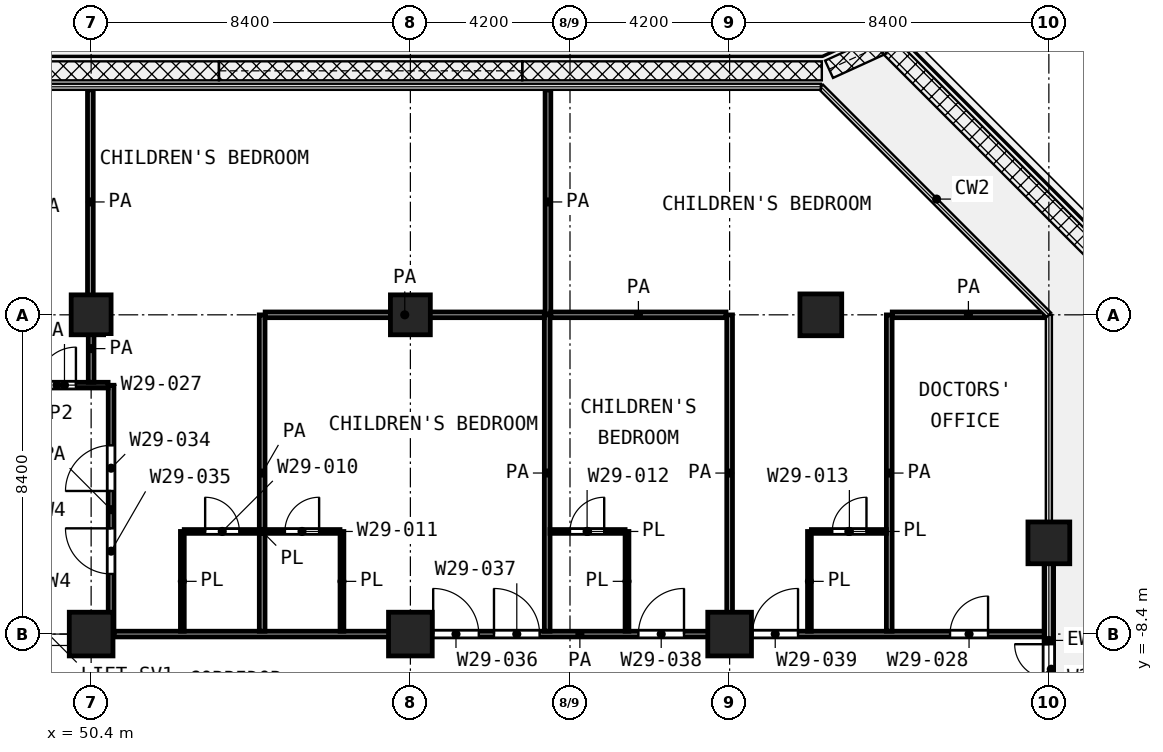
"""IFC4 building model, lengths in metres.
Left out: names, types, materials, properties, quantities, classifications, styles, units other than length and angle.
Written with IfcOpenShell. Run it as: python <this file> out.ifc"""

import sys

from ifc_helpers import new_model, si_unit, direction, frame, frame_2d, origin, origin_2d, place, context, subcontext, project, spatial, rectangle, extrude, element, fill, save


model = new_model("IFC4")
c1 = context("Model", 3, precision=1e-05, world=origin(), true_north=direction((0.0, 1.0)))
c2 = subcontext(c1, "Body", "Model", "MODEL_VIEW")
j1 = project(units=[si_unit("LENGTHUNIT", "METRE"), si_unit("PLANEANGLEUNIT", "RADIAN")], contexts=[c1])
p1 = place(None, origin())
s1 = spatial("IfcSite", under=j1, at=p1, CompositionType="ELEMENT")
p2 = place(p1, origin())
s2 = spatial("IfcBuilding", under=s1, at=p2, CompositionType="ELEMENT")
p3 = place(p2, frame((0.0, 0.0, 149.2)))
s3 = spatial("IfcBuildingStorey", under=s2, at=p3, CompositionType="ELEMENT", Elevation=149.2)
for number, where, z_axis, x_axis in (
    (1, (50.4, 0.0, 0.0), (0.0, 0.0, 1.0), (1.0, 0.0, 0.0)),
    (2, (58.8, 0.0, 0.0), (0.0, 0.0, 1.0), (1.0, 0.0, 0.0)),
):
    element("IfcColumn", number, at=place(p3, frame(where, z_axis=z_axis, x_axis=x_axis)), inside=s3, PredefinedType="COLUMN", context=c2, shape_type="SweptSolid", body=[
        extrude(rectangle(XDim=1.05, YDim=1.05, at=origin_2d()), origin(), (0.0, 0.0, 1.0), 4.2),
    ])
for number, where, z_axis, x_axis in (
    (3, (69.6, 0.0, 0.0), (0.0, 0.0, 1.0), (1.0, 0.0, 0.0)),
    (4, (75.6, -6.0, 0.0), (0.0, 0.0, 1.0), (1.0, 0.0, 0.0)),
):
    element("IfcColumn", number, at=place(p3, frame(where, z_axis=z_axis, x_axis=x_axis)), inside=s3, PredefinedType="COLUMN", context=c2, shape_type="SweptSolid", body=[
        extrude(rectangle(XDim=1.1, YDim=1.1, at=origin_2d()), origin(), (0.0, 0.0, 1.0), 4.2),
    ])
for number, where, z_axis, x_axis in (
    (5, (50.4, -8.4, 0.0), (0.0, 0.0, 1.0), (1.0, 0.0, 0.0)),
    (6, (58.8, -8.4, 0.0), (0.0, 0.0, 1.0), (1.0, 0.0, 0.0)),
    (7, (67.2, -8.4, 0.0), (0.0, 0.0, 1.0), (1.0, 0.0, 0.0)),
):
    element("IfcColumn", number, at=place(p3, frame(where, z_axis=z_axis, x_axis=x_axis)), inside=s3, PredefinedType="COLUMN", context=c2, shape_type="SweptSolid", body=[
        extrude(rectangle(XDim=1.15, YDim=1.15, at=origin_2d()), origin(), (0.0, 0.0, 1.0), 4.2),
    ])
p4 = place(p3, frame((75.6, -10.583, 0.0), z_axis=(0.0, 0.0, 1.0), x_axis=(0.0, 1.0, 0.0)))
e8 = element("IfcWall", 8, at=p4, inside=s3, PredefinedType="SOLIDWALL", context=c2, shape_type="SweptSolid", body=[
    extrude(rectangle(XDim=4.033, YDim=0.25, at=frame_2d((2.017, 0.0))), origin(), (0.0, 0.0, 1.0), 3.58),
])
p5 = place(p4, frame((0.117, 0.0, 0.0)))
e9 = element("IfcOpeningElement", 9, at=p5, cuts=e8, PredefinedType="OPENING", context=c2, shape_type="SweptSolid", body=[
    extrude(rectangle(XDim=1.8, YDim=2.1, at=frame_2d((0.9, 1.05))), frame((0.0, 0.135, 0.0), z_axis=(0.0, -1.0, 0.0), x_axis=(1.0, 0.0, 0.0)), (0.0, 0.0, 1.0), 0.27),
])
p6 = place(p3, frame((52.85, -5.7, 0.0), z_axis=(0.0, 0.0, 1.0), x_axis=(1.0, 0.0, 0.0)))
e10 = element("IfcWall", 10, at=p6, inside=s3, PredefinedType="PARTITIONING", context=c2, shape_type="SweptSolid", body=[
    extrude(rectangle(XDim=4.098, YDim=0.1, at=frame_2d((2.049, 0.0))), origin(), (0.0, 0.0, 1.0), 3.7),
])
p7 = place(p6, frame((0.55, 0.0, 0.0)))
e11 = element("IfcOpeningElement", 11, at=p7, cuts=e10, PredefinedType="OPENING", context=c2, shape_type="SweptSolid", body=[
    extrude(rectangle(XDim=0.9, YDim=2.1, at=frame_2d((0.45, 1.05))), frame((0.0, 0.06, 0.0), z_axis=(0.0, -1.0, 0.0), x_axis=(1.0, 0.0, 0.0)), (0.0, 0.0, 1.0), 0.12),
])
p8 = place(p6, frame((2.649, 0.0, 0.0)))
e12 = element("IfcOpeningElement", 12, at=p8, cuts=e10, PredefinedType="OPENING", context=c2, shape_type="SweptSolid", body=[
    extrude(rectangle(XDim=0.9, YDim=2.1, at=frame_2d((0.45, 1.05))), frame((0.0, 0.06, 0.0), z_axis=(0.0, -1.0, 0.0), x_axis=(1.0, 0.0, 0.0)), (0.0, 0.0, 1.0), 0.12),
])
p9 = place(p3, frame((62.475, -5.7, 0.0), z_axis=(0.0, 0.0, 1.0), x_axis=(1.0, 0.0, 0.0)))
e13 = element("IfcWall", 13, at=p9, inside=s3, PredefinedType="PARTITIONING", context=c2, shape_type="SweptSolid", body=[
    extrude(rectangle(XDim=1.975, YDim=0.1, at=frame_2d((0.987, 0.0))), origin(), (0.0, 0.0, 1.0), 3.7),
])
p10 = place(p9, frame((0.525, 0.0, 0.0)))
e14 = element("IfcOpeningElement", 14, at=p10, cuts=e13, PredefinedType="OPENING", context=c2, shape_type="SweptSolid", body=[
    extrude(rectangle(XDim=0.9, YDim=2.1, at=frame_2d((0.45, 1.05))), frame((0.0, 0.06, 0.0), z_axis=(0.0, -1.0, 0.0), x_axis=(1.0, 0.0, 0.0)), (0.0, 0.0, 1.0), 0.12),
])
p11 = place(p3, frame((69.352, -5.7, 0.0), z_axis=(0.0, 0.0, 1.0), x_axis=(1.0, 0.0, 0.0)))
e15 = element("IfcWall", 15, at=p11, inside=s3, PredefinedType="PARTITIONING", context=c2, shape_type="SweptSolid", body=[
    extrude(rectangle(XDim=1.973, YDim=0.1, at=frame_2d((0.986, 0.0))), origin(), (0.0, 0.0, 1.0), 3.7),
])
p12 = place(p11, frame((0.549, 0.0, 0.0)))
e16 = element("IfcOpeningElement", 16, at=p12, cuts=e15, PredefinedType="OPENING", context=c2, shape_type="SweptSolid", body=[
    extrude(rectangle(XDim=0.9, YDim=2.1, at=frame_2d((0.45, 1.05))), frame((0.0, 0.06, 0.0), z_axis=(0.0, -1.0, 0.0), x_axis=(1.0, 0.0, 0.0)), (0.0, 0.0, 1.0), 0.12),
])
p13 = place(p3, frame((52.8, -8.325, 0.0), z_axis=(0.0, 0.0, 1.0), x_axis=(0.0, 1.0, 0.0)))
e17 = element("IfcWall", 17, at=p13, inside=s3, PredefinedType="PARTITIONING", context=c2, shape_type="SweptSolid", body=[
    extrude(rectangle(XDim=2.625, YDim=0.1, at=frame_2d((1.312, 0.0))), origin(), (0.0, 0.0, 1.0), 3.7),
])
p14 = place(p3, frame((57.0, -8.325, 0.0), z_axis=(0.0, 0.0, 1.0), x_axis=(0.0, 1.0, 0.0)))
e18 = element("IfcWall", 18, at=p14, inside=s3, PredefinedType="PARTITIONING", context=c2, shape_type="SweptSolid", body=[
    extrude(rectangle(XDim=2.624, YDim=0.1, at=frame_2d((1.312, 0.0))), origin(), (0.0, 0.0, 1.0), 3.7),
])
p15 = place(p3, frame((64.5, -8.325, 0.0), z_axis=(0.0, 0.0, 1.0), x_axis=(0.0, 1.0, 0.0)))
e19 = element("IfcWall", 19, at=p15, inside=s3, PredefinedType="PARTITIONING", context=c2, shape_type="SweptSolid", body=[
    extrude(rectangle(XDim=2.625, YDim=0.1, at=frame_2d((1.312, 0.0))), origin(), (0.0, 0.0, 1.0), 3.7),
])
p16 = place(p3, frame((69.3, -8.325, 0.0), z_axis=(0.0, 0.0, 1.0), x_axis=(0.0, 1.0, 0.0)))
e20 = element("IfcWall", 20, at=p16, inside=s3, PredefinedType="PARTITIONING", context=c2, shape_type="SweptSolid", body=[
    extrude(rectangle(XDim=2.624, YDim=0.1, at=frame_2d((1.312, 0.0))), origin(), (0.0, 0.0, 1.0), 3.7),
])
p17 = place(p3, frame((51.0, -8.4, 0.0), z_axis=(0.0, 0.0, 1.0), x_axis=(1.0, 0.0, 0.0)))
e21 = element("IfcWall", 21, at=p17, inside=s3, PredefinedType="PARTITIONING", context=c2, shape_type="SweptSolid", body=[
    extrude(rectangle(XDim=24.52, YDim=0.15, at=frame_2d((12.26, 0.0))), origin(), (0.0, 0.0, 1.0), 3.7),
])
p18 = place(p17, frame((8.4, 0.0, 0.0)))
e22 = element("IfcOpeningElement", 22, at=p18, cuts=e21, PredefinedType="OPENING", context=c2, shape_type="SweptSolid", body=[
    extrude(rectangle(XDim=1.2, YDim=2.1, at=frame_2d((0.6, 1.05))), frame((0.0, 0.085, 0.0), z_axis=(0.0, -1.0, 0.0), x_axis=(1.0, 0.0, 0.0)), (0.0, 0.0, 1.0), 0.17),
])
p19 = place(p17, frame((10.0, 0.0, 0.0)))
e23 = element("IfcOpeningElement", 23, at=p19, cuts=e21, PredefinedType="OPENING", context=c2, shape_type="SweptSolid", body=[
    extrude(rectangle(XDim=1.2, YDim=2.1, at=frame_2d((0.6, 1.05))), frame((0.0, 0.085, 0.0), z_axis=(0.0, -1.0, 0.0), x_axis=(1.0, 0.0, 0.0)), (0.0, 0.0, 1.0), 0.17),
])
p20 = place(p17, frame((13.8, 0.0, 0.0)))
e24 = element("IfcOpeningElement", 24, at=p20, cuts=e21, PredefinedType="OPENING", context=c2, shape_type="SweptSolid", body=[
    extrude(rectangle(XDim=1.2, YDim=2.1, at=frame_2d((0.6, 1.05))), frame((0.0, 0.085, 0.0), z_axis=(0.0, -1.0, 0.0), x_axis=(1.0, 0.0, 0.0)), (0.0, 0.0, 1.0), 0.17),
])
p21 = place(p17, frame((16.8, 0.0, 0.0)))
e25 = element("IfcOpeningElement", 25, at=p21, cuts=e21, PredefinedType="OPENING", context=c2, shape_type="SweptSolid", body=[
    extrude(rectangle(XDim=1.2, YDim=2.1, at=frame_2d((0.6, 1.05))), frame((0.0, 0.085, 0.0), z_axis=(0.0, -1.0, 0.0), x_axis=(1.0, 0.0, 0.0)), (0.0, 0.0, 1.0), 0.17),
])
p22 = place(p17, frame((22.0, 0.0, 0.0)))
e26 = element("IfcOpeningElement", 26, at=p22, cuts=e21, PredefinedType="OPENING", context=c2, shape_type="SweptSolid", body=[
    extrude(rectangle(XDim=1.0, YDim=2.1, at=frame_2d((0.5, 1.05))), frame((0.0, 0.085, 0.0), z_axis=(0.0, -1.0, 0.0), x_axis=(1.0, 0.0, 0.0)), (0.0, 0.0, 1.0), 0.17),
])
p23 = place(p3, frame((48.55, -1.85, 0.0), z_axis=(0.0, 0.0, 1.0), x_axis=(1.0, 0.0, 0.0)))
e27 = element("IfcWall", 27, at=p23, inside=s3, PredefinedType="PARTITIONING", context=c2, shape_type="SweptSolid", body=[
    extrude(rectangle(XDim=2.297, YDim=0.15, at=frame_2d((1.148, 0.0))), origin(), (0.0, 0.0, 1.0), 3.7),
])
p24 = place(p23, frame((0.45, 0.0, 0.0)))
e28 = element("IfcOpeningElement", 28, at=p24, cuts=e27, PredefinedType="OPENING", context=c2, shape_type="SweptSolid", body=[
    extrude(rectangle(XDim=1.0, YDim=2.1, at=frame_2d((0.5, 1.05))), frame((0.0, 0.085, 0.0), z_axis=(0.0, -1.0, 0.0), x_axis=(1.0, 0.0, 0.0)), (0.0, 0.0, 1.0), 0.17),
])
p25 = place(p3, frame((54.979, 0.0, 0.0), z_axis=(0.0, 0.0, 1.0), x_axis=(1.0, 0.0, 0.0)))
e29 = element("IfcWall", 29, at=p25, inside=s3, PredefinedType="PARTITIONING", context=c2, shape_type="SweptSolid", body=[
    extrude(rectangle(XDim=7.346, YDim=0.15, at=frame_2d((3.673, 0.0))), origin(), (0.0, 0.0, 1.0), 3.7),
])
p26 = place(p3, frame((62.495, 0.0, 0.0), z_axis=(0.0, 0.0, 1.0), x_axis=(1.0, 0.0, 0.0)))
e30 = element("IfcWall", 30, at=p26, inside=s3, PredefinedType="PARTITIONING", context=c2, shape_type="SweptSolid", body=[
    extrude(rectangle(XDim=4.61, YDim=0.15, at=frame_2d((2.305, 0.0))), origin(), (0.0, 0.0, 1.0), 3.7),
])
p27 = place(p3, frame((71.479, 0.0, 0.0), z_axis=(0.0, 0.0, 1.0), x_axis=(1.0, 0.0, 0.0)))
e31 = element("IfcWall", 31, at=p27, inside=s3, PredefinedType="PARTITIONING", context=c2, shape_type="SweptSolid", body=[
    extrude(rectangle(XDim=4.008, YDim=0.15, at=frame_2d((2.004, 0.0))), origin(), (0.0, 0.0, 1.0), 3.7),
])
p28 = place(p3, frame((50.38, 0.02, 0.0), z_axis=(0.0, 0.0, 1.0), x_axis=(0.0, 1.0, 0.0)))
e32 = element("IfcWall", 32, at=p28, inside=s3, PredefinedType="PARTITIONING", context=c2, shape_type="SweptSolid", body=[
    extrude(rectangle(XDim=5.9, YDim=0.15, at=frame_2d((2.95, 0.0))), origin(), (0.0, 0.0, 1.0), 3.7),
])
p29 = place(p3, frame((50.4, -1.775, 0.0), z_axis=(0.0, 0.0, 1.0), x_axis=(0.0, 1.0, 0.0)))
e33 = element("IfcWall", 33, at=p29, inside=s3, PredefinedType="PARTITIONING", context=c2, shape_type="SweptSolid", body=[
    extrude(rectangle(XDim=1.772, YDim=0.15, at=frame_2d((0.886, 0.0))), origin(), (0.0, 0.0, 1.0), 3.7),
])
p30 = place(p3, frame((50.925, -8.4, 0.0), z_axis=(0.0, 0.0, 1.0), x_axis=(0.0, 1.0, 0.0)))
e34 = element("IfcWall", 34, at=p30, inside=s3, PredefinedType="PARTITIONING", context=c2, shape_type="SweptSolid", body=[
    extrude(rectangle(XDim=6.547, YDim=0.15, at=frame_2d((3.273, 0.0))), origin(), (0.0, 0.0, 1.0), 3.7),
])
p31 = place(p30, frame((3.765, 0.0, 0.0)))
e35 = element("IfcOpeningElement", 35, at=p31, cuts=e34, PredefinedType="OPENING", context=c2, shape_type="SweptSolid", body=[
    extrude(rectangle(XDim=1.2, YDim=2.1, at=frame_2d((0.6, 1.05))), frame((0.0, 0.085, 0.0), z_axis=(0.0, -1.0, 0.0), x_axis=(1.0, 0.0, 0.0)), (0.0, 0.0, 1.0), 0.17),
])
p32 = place(p30, frame((1.582, 0.0, 0.0)))
e36 = element("IfcOpeningElement", 36, at=p32, cuts=e34, PredefinedType="OPENING", context=c2, shape_type="SweptSolid", body=[
    extrude(rectangle(XDim=1.2, YDim=2.1, at=frame_2d((0.6, 1.05))), frame((0.0, 0.085, 0.0), z_axis=(0.0, -1.0, 0.0), x_axis=(1.0, 0.0, 0.0)), (0.0, 0.0, 1.0), 0.17),
])
p33 = place(p3, frame((54.9, -8.325, 0.0), z_axis=(0.0, 0.0, 1.0), x_axis=(0.0, 1.0, 0.0)))
e37 = element("IfcWall", 37, at=p33, inside=s3, PredefinedType="PARTITIONING", context=c2, shape_type="SweptSolid", body=[
    extrude(rectangle(XDim=8.323, YDim=0.15, at=frame_2d((4.162, 0.0))), origin(), (0.0, 0.0, 1.0), 3.7),
])
p34 = place(p3, frame((62.4, -8.325, 0.0), z_axis=(0.0, 0.0, 1.0), x_axis=(0.0, 1.0, 0.0)))
e38 = element("IfcWall", 38, at=p34, inside=s3, PredefinedType="PARTITIONING", context=c2, shape_type="SweptSolid", body=[
    extrude(rectangle(XDim=8.325, YDim=0.15, at=frame_2d((4.163, 0.0))), origin(), (0.0, 0.0, 1.0), 3.7),
])
p35 = place(p3, frame((62.42, 0.02, 0.0), z_axis=(0.0, 0.0, 1.0), x_axis=(0.0, 1.0, 0.0)))
e39 = element("IfcWall", 39, at=p35, inside=s3, PredefinedType="PARTITIONING", context=c2, shape_type="SweptSolid", body=[
    extrude(rectangle(XDim=5.9, YDim=0.15, at=frame_2d((2.95, 0.0))), origin(), (0.0, 0.0, 1.0), 3.7),
])
for number, where, z_axis, x_axis in (
    (40, (67.2, -8.325, 0.0), (0.0, 0.0, 1.0), (0.0, 1.0, 0.0)),
    (41, (71.4, -8.325, 0.0), (0.0, 0.0, 1.0), (0.0, 1.0, 0.0)),
):
    element("IfcWall", number, at=place(p3, frame(where, z_axis=z_axis, x_axis=x_axis)), inside=s3, PredefinedType="PARTITIONING", context=c2, shape_type="SweptSolid", body=[
        extrude(rectangle(XDim=8.323, YDim=0.15, at=frame_2d((4.162, 0.0))), origin(), (0.0, 0.0, 1.0), 3.7),
    ])
p36 = place(p5, origin())
e42 = element("IfcDoor", 42, at=p36, inside=s3, OperationType="DOUBLE_DOOR_SINGLE_SWING", PredefinedType="DOOR", context=c2, shape_type="SweptSolid", body=[
    extrude(rectangle(XDim=1.8, YDim=2.1, at=frame_2d((0.9, 1.05))), frame((0.0, 0.025, 0.0), z_axis=(0.0, -1.0, 0.0), x_axis=(1.0, 0.0, 0.0)), (0.0, 0.0, 1.0), 0.05),
])
fill(e9, e42)
p37 = place(p24, origin())
e43 = element("IfcDoor", 43, at=p37, inside=s3, OperationType="SINGLE_SWING_RIGHT", PredefinedType="DOOR", context=c2, shape_type="SweptSolid", body=[
    extrude(rectangle(XDim=1.0, YDim=2.1, at=frame_2d((0.5, 1.05))), frame((0.0, 0.025, 0.0), z_axis=(0.0, -1.0, 0.0), x_axis=(1.0, 0.0, 0.0)), (0.0, 0.0, 1.0), 0.05),
])
fill(e28, e43)
p38 = place(p31, origin())
e44 = element("IfcDoor", 44, at=p38, inside=s3, OperationType="SINGLE_SWING_LEFT", PredefinedType="DOOR", context=c2, shape_type="SweptSolid", body=[
    extrude(rectangle(XDim=1.2, YDim=2.1, at=frame_2d((0.6, 1.05))), frame((0.0, 0.025, 0.0), z_axis=(0.0, -1.0, 0.0), x_axis=(1.0, 0.0, 0.0)), (0.0, 0.0, 1.0), 0.05),
])
fill(e35, e44)
p39 = place(p32, origin())
e45 = element("IfcDoor", 45, at=p39, inside=s3, OperationType="SINGLE_SWING_RIGHT", PredefinedType="DOOR", context=c2, shape_type="SweptSolid", body=[
    extrude(rectangle(XDim=1.2, YDim=2.1, at=frame_2d((0.6, 1.05))), frame((0.0, 0.025, 0.0), z_axis=(0.0, -1.0, 0.0), x_axis=(1.0, 0.0, 0.0)), (0.0, 0.0, 1.0), 0.05),
])
fill(e36, e45)
p40 = place(p7, origin())
e46 = element("IfcDoor", 46, at=p40, inside=s3, OperationType="SINGLE_SWING_LEFT", PredefinedType="DOOR", context=c2, shape_type="SweptSolid", body=[
    extrude(rectangle(XDim=0.9, YDim=2.1, at=frame_2d((0.45, 1.05))), frame((0.0, 0.025, 0.0), z_axis=(0.0, -1.0, 0.0), x_axis=(1.0, 0.0, 0.0)), (0.0, 0.0, 1.0), 0.05),
])
fill(e11, e46)
p41 = place(p18, origin())
e47 = element("IfcDoor", 47, at=p41, inside=s3, OperationType="SINGLE_SWING_LEFT", PredefinedType="DOOR", context=c2, shape_type="SweptSolid", body=[
    extrude(rectangle(XDim=1.2, YDim=2.1, at=frame_2d((0.6, 1.05))), frame((0.0, 0.025, 0.0), z_axis=(0.0, -1.0, 0.0), x_axis=(1.0, 0.0, 0.0)), (0.0, 0.0, 1.0), 0.05),
])
fill(e22, e47)
p42 = place(p19, origin())
e48 = element("IfcDoor", 48, at=p42, inside=s3, OperationType="SINGLE_SWING_LEFT", PredefinedType="DOOR", context=c2, shape_type="SweptSolid", body=[
    extrude(rectangle(XDim=1.2, YDim=2.1, at=frame_2d((0.6, 1.05))), frame((0.0, 0.025, 0.0), z_axis=(0.0, -1.0, 0.0), x_axis=(1.0, 0.0, 0.0)), (0.0, 0.0, 1.0), 0.05),
])
fill(e23, e48)
p43 = place(p8, origin())
e49 = element("IfcDoor", 49, at=p43, inside=s3, OperationType="SINGLE_SWING_RIGHT", PredefinedType="DOOR", context=c2, shape_type="SweptSolid", body=[
    extrude(rectangle(XDim=0.9, YDim=2.1, at=frame_2d((0.45, 1.05))), frame((0.0, 0.025, 0.0), z_axis=(0.0, -1.0, 0.0), x_axis=(1.0, 0.0, 0.0)), (0.0, 0.0, 1.0), 0.05),
])
fill(e12, e49)
p44 = place(p20, origin())
e50 = element("IfcDoor", 50, at=p44, inside=s3, OperationType="SINGLE_SWING_RIGHT", PredefinedType="DOOR", context=c2, shape_type="SweptSolid", body=[
    extrude(rectangle(XDim=1.2, YDim=2.1, at=frame_2d((0.6, 1.05))), frame((0.0, 0.025, 0.0), z_axis=(0.0, -1.0, 0.0), x_axis=(1.0, 0.0, 0.0)), (0.0, 0.0, 1.0), 0.05),
])
fill(e24, e50)
p45 = place(p10, origin())
e51 = element("IfcDoor", 51, at=p45, inside=s3, OperationType="SINGLE_SWING_RIGHT", PredefinedType="DOOR", context=c2, shape_type="SweptSolid", body=[
    extrude(rectangle(XDim=0.9, YDim=2.1, at=frame_2d((0.45, 1.05))), frame((0.0, 0.025, 0.0), z_axis=(0.0, -1.0, 0.0), x_axis=(1.0, 0.0, 0.0)), (0.0, 0.0, 1.0), 0.05),
])
fill(e14, e51)
p46 = place(p21, origin())
e52 = element("IfcDoor", 52, at=p46, inside=s3, OperationType="SINGLE_SWING_RIGHT", PredefinedType="DOOR", context=c2, shape_type="SweptSolid", body=[
    extrude(rectangle(XDim=1.2, YDim=2.1, at=frame_2d((0.6, 1.05))), frame((0.0, 0.025, 0.0), z_axis=(0.0, -1.0, 0.0), x_axis=(1.0, 0.0, 0.0)), (0.0, 0.0, 1.0), 0.05),
])
fill(e25, e52)
p47 = place(p12, origin())
e53 = element("IfcDoor", 53, at=p47, inside=s3, OperationType="SINGLE_SWING_RIGHT", PredefinedType="DOOR", context=c2, shape_type="SweptSolid", body=[
    extrude(rectangle(XDim=0.9, YDim=2.1, at=frame_2d((0.45, 1.05))), frame((0.0, 0.025, 0.0), z_axis=(0.0, -1.0, 0.0), x_axis=(1.0, 0.0, 0.0)), (0.0, 0.0, 1.0), 0.05),
])
fill(e16, e53)
p48 = place(p22, origin())
e54 = element("IfcDoor", 54, at=p48, inside=s3, OperationType="SINGLE_SWING_RIGHT", PredefinedType="DOOR", context=c2, shape_type="SweptSolid", body=[
    extrude(rectangle(XDim=1.0, YDim=2.1, at=frame_2d((0.5, 1.05))), frame((0.0, 0.025, 0.0), z_axis=(0.0, -1.0, 0.0), x_axis=(1.0, 0.0, 0.0)), (0.0, 0.0, 1.0), 0.05),
])
fill(e26, e54)
save(model, sys.argv[1])
